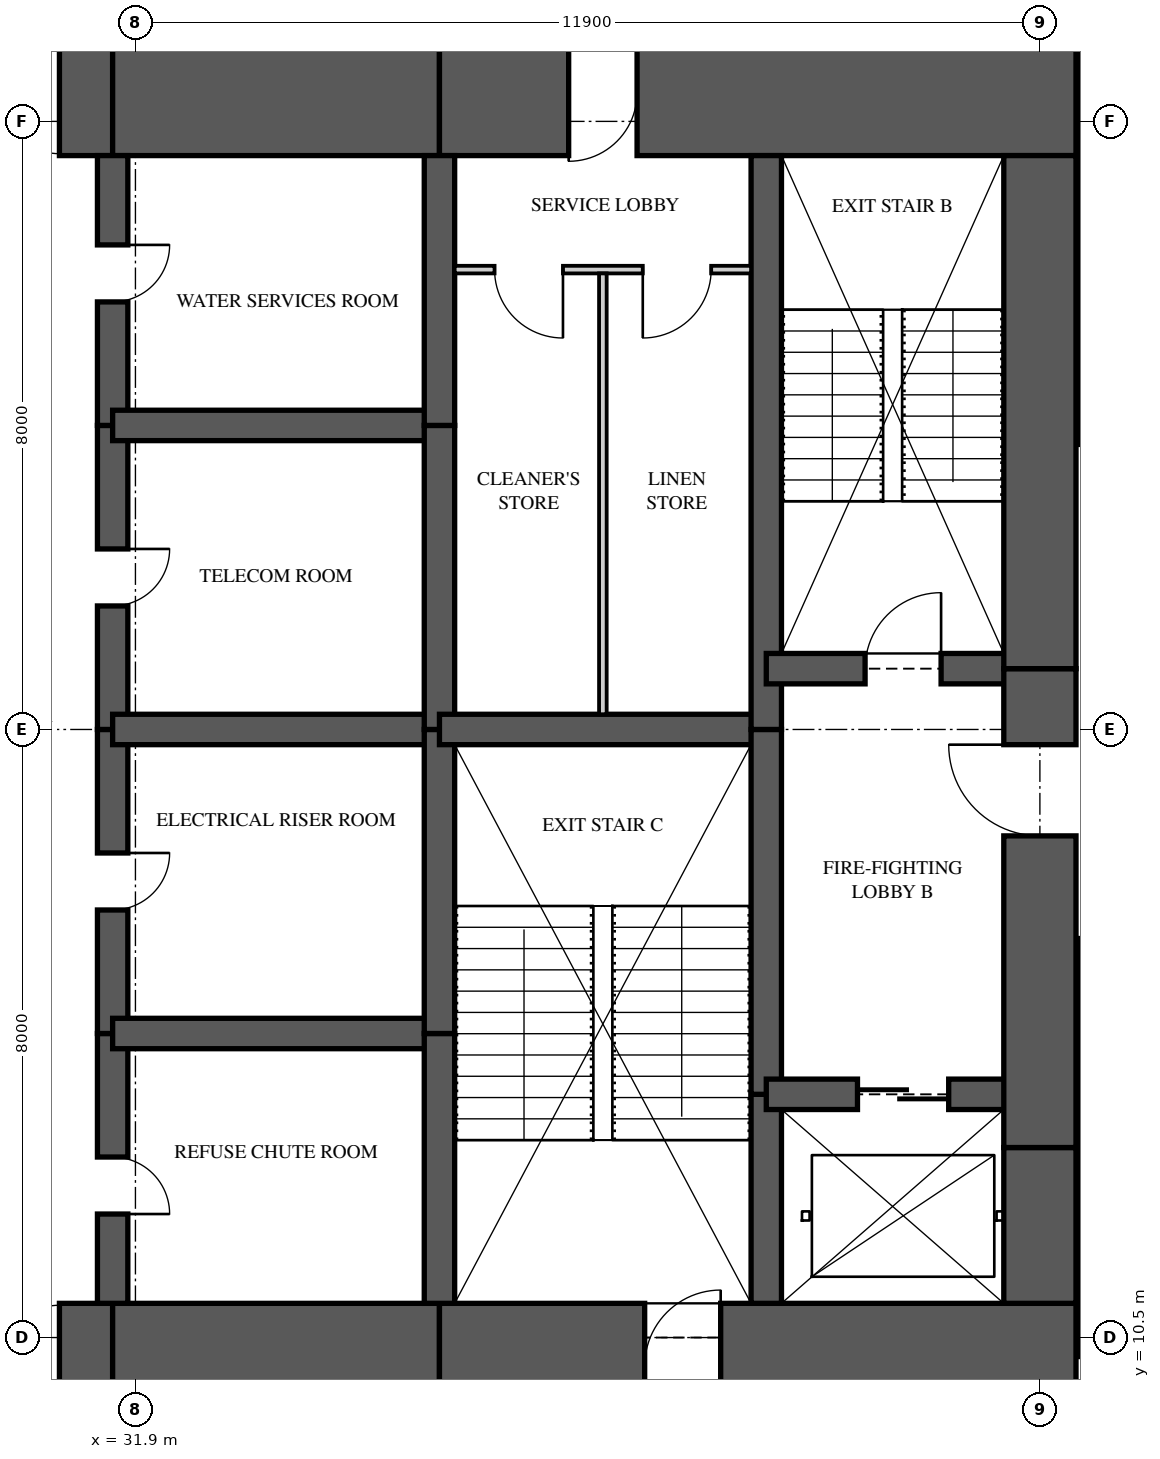
"""IFC4 building model, lengths in metres.
Left out: names, types, materials, properties, quantities, classifications, styles, units other than length and angle.
Written with IfcOpenShell. Run it as: python <this file> out.ifc"""

import sys

from ifc_helpers import new_model, si_unit, direction, frame, frame_2d, origin, place, context, subcontext, project, spatial, rectangle, extrude, element, fill, save


model = new_model("IFC4")
c1 = context("Model", 3, precision=1e-05, world=origin(), true_north=direction((0.0, 1.0)))
c2 = subcontext(c1, "Body", "Model", "MODEL_VIEW")
j1 = project(units=[si_unit("LENGTHUNIT", "METRE"), si_unit("PLANEANGLEUNIT", "RADIAN")], contexts=[c1])
p1 = place(None, origin())
s1 = spatial("IfcSite", under=j1, at=p1, CompositionType="ELEMENT")
p2 = place(p1, origin())
s2 = spatial("IfcBuilding", under=s1, at=p2, CompositionType="ELEMENT")
p3 = place(p2, frame((0.0, 0.0, 47.8)))
s3 = spatial("IfcBuildingStorey", under=s2, at=p3, CompositionType="ELEMENT", Elevation=47.8)
p4 = place(p3, frame((26.0, 10.125, 0.0), z_axis=(0.0, 0.0, 1.0), x_axis=(1.0, 0.0, 0.0)))
e1 = element("IfcWall", 1, at=p4, inside=s3, PredefinedType="SHEAR", context=c2, shape_type="SweptSolid", body=[
    extrude(rectangle(XDim=5.6, YDim=1.65, at=frame_2d((2.8, 0.0))), origin(), (0.0, 0.0, 1.0), 3.35),
])
p5 = place(p4, frame((3.3, 0.0, 0.0)))
e2 = element("IfcOpeningElement", 2, at=p5, cuts=e1, PredefinedType="OPENING", context=c2, shape_type="SweptSolid", body=[
    extrude(rectangle(XDim=1.6, YDim=2.1, at=frame_2d((0.8, 1.05))), frame((0.0, 0.835, 0.0), z_axis=(0.0, -1.0, 0.0), x_axis=(1.0, 0.0, 0.0)), (0.0, 0.0, 1.0), 1.67),
])
p6 = place(p3, frame((31.6, 10.125, 0.0), z_axis=(0.0, 0.0, 1.0), x_axis=(1.0, 0.0, 0.0)))
e3 = element("IfcWall", 3, at=p6, inside=s3, PredefinedType="SHEAR", context=c2, shape_type="SweptSolid", body=[
    extrude(rectangle(XDim=4.3, YDim=1.65, at=frame_2d((2.15, 0.0))), origin(), (0.0, 0.0, 1.0), 3.35),
])
p7 = place(p3, frame((35.9, 10.125, 0.0), z_axis=(0.0, 0.0, 1.0), x_axis=(1.0, 0.0, 0.0)))
e4 = element("IfcWall", 4, at=p7, inside=s3, PredefinedType="SHEAR", context=c2, shape_type="SweptSolid", body=[
    extrude(rectangle(XDim=8.375, YDim=1.65, at=frame_2d((4.188, 0.0))), origin(), (0.0, 0.0, 1.0), 3.35),
])
p8 = place(p7, frame((2.7, 0.0, 0.0)))
e5 = element("IfcOpeningElement", 5, at=p8, cuts=e4, PredefinedType="OPENING", context=c2, shape_type="SweptSolid", body=[
    extrude(rectangle(XDim=1.0, YDim=2.1, at=frame_2d((0.5, 1.05))), frame((0.0, 0.835, 0.0), z_axis=(0.0, -1.0, 0.0), x_axis=(1.0, 0.0, 0.0)), (0.0, 0.0, 1.0), 1.67),
])
p9 = place(p3, frame((44.275, 26.875, 0.0), z_axis=(0.0, 0.0, 1.0), x_axis=(-1.0, 0.0, 0.0)))
e6 = element("IfcWall", 6, at=p9, inside=s3, PredefinedType="SHEAR", context=c2, shape_type="SweptSolid", body=[
    extrude(rectangle(XDim=8.375, YDim=1.65, at=frame_2d((4.188, 0.0))), origin(), (0.0, 0.0, 1.0), 3.35),
])
p10 = place(p9, frame((5.775, 0.0, 0.0)))
e7 = element("IfcOpeningElement", 7, at=p10, cuts=e6, PredefinedType="OPENING", context=c2, shape_type="SweptSolid", body=[
    extrude(rectangle(XDim=0.9, YDim=2.1, at=frame_2d((0.45, 1.05))), frame((0.0, 0.835, 0.0), z_axis=(0.0, -1.0, 0.0), x_axis=(1.0, 0.0, 0.0)), (0.0, 0.0, 1.0), 1.67),
])
p11 = place(p3, frame((35.9, 26.875, 0.0), z_axis=(0.0, 0.0, 1.0), x_axis=(-1.0, 0.0, 0.0)))
e8 = element("IfcWall", 8, at=p11, inside=s3, PredefinedType="SHEAR", context=c2, shape_type="SweptSolid", body=[
    extrude(rectangle(XDim=4.3, YDim=1.65, at=frame_2d((2.15, 0.0))), origin(), (0.0, 0.0, 1.0), 3.35),
])
p12 = place(p3, frame((31.6, 26.875, 0.0), z_axis=(0.0, 0.0, 1.0), x_axis=(-1.0, 0.0, 0.0)))
e9 = element("IfcWall", 9, at=p12, inside=s3, PredefinedType="SHEAR", context=c2, shape_type="SweptSolid", body=[
    extrude(rectangle(XDim=5.6, YDim=1.65, at=frame_2d((2.8, 0.0))), origin(), (0.0, 0.0, 1.0), 3.35),
])
p13 = place(p12, frame((0.7, 0.0, 0.0)))
e10 = element("IfcOpeningElement", 10, at=p13, cuts=e9, PredefinedType="OPENING", context=c2, shape_type="SweptSolid", body=[
    extrude(rectangle(XDim=1.6, YDim=2.1, at=frame_2d((0.8, 1.05))), frame((0.0, 0.835, 0.0), z_axis=(0.0, -1.0, 0.0), x_axis=(1.0, 0.0, 0.0)), (0.0, 0.0, 1.0), 1.67),
])
p14 = place(p3, frame((43.8, 10.95, 0.0), z_axis=(0.0, 0.0, 1.0), x_axis=(0.0, 1.0, 0.0)))
e11 = element("IfcWall", 11, at=p14, inside=s3, PredefinedType="SHEAR", context=c2, shape_type="SweptSolid", body=[
    extrude(rectangle(XDim=2.05, YDim=0.95, at=frame_2d((1.025, 0.0))), origin(), (0.0, 0.0, 1.0), 3.35),
])
p15 = place(p3, frame((43.8, 13.0, 0.0), z_axis=(0.0, 0.0, 1.0), x_axis=(0.0, 1.0, 0.0)))
e12 = element("IfcWall", 12, at=p15, inside=s3, PredefinedType="SHEAR", context=c2, shape_type="SweptSolid", body=[
    extrude(rectangle(XDim=6.3, YDim=0.95, at=frame_2d((3.15, 0.0))), origin(), (0.0, 0.0, 1.0), 3.35),
])
p16 = place(p15, frame((4.1, 0.0, 0.0)))
e13 = element("IfcOpeningElement", 13, at=p16, cuts=e12, PredefinedType="OPENING", context=c2, shape_type="SweptSolid", body=[
    extrude(rectangle(XDim=1.2, YDim=2.2, at=frame_2d((0.6, 1.1))), frame((0.0, 0.485, 0.0), z_axis=(0.0, -1.0, 0.0), x_axis=(1.0, 0.0, 0.0)), (0.0, 0.0, 1.0), 0.97),
])
p17 = place(p3, frame((43.8, 19.3, 0.0), z_axis=(0.0, 0.0, 1.0), x_axis=(0.0, 1.0, 0.0)))
e14 = element("IfcWall", 14, at=p17, inside=s3, PredefinedType="SHEAR", context=c2, shape_type="SweptSolid", body=[
    extrude(rectangle(XDim=6.75, YDim=0.95, at=frame_2d((3.375, 0.0))), origin(), (0.0, 0.0, 1.0), 3.35),
])
p18 = place(p3, frame((31.6, 10.95, 0.0), z_axis=(0.0, 0.0, 1.0), x_axis=(0.0, 1.0, 0.0)))
e15 = element("IfcWall", 15, at=p18, inside=s3, PredefinedType="SHEAR", context=c2, shape_type="SweptSolid", body=[
    extrude(rectangle(XDim=3.55, YDim=0.4, at=frame_2d((1.775, 0.0))), origin(), (0.0, 0.0, 1.0), 3.35),
])
p19 = place(p18, frame((1.175, 0.0, 0.0)))
e16 = element("IfcOpeningElement", 16, at=p19, cuts=e15, PredefinedType="OPENING", context=c2, shape_type="SweptSolid", body=[
    extrude(rectangle(XDim=0.75, YDim=2.1, at=frame_2d((0.375, 1.05))), frame((0.0, 0.21, 0.0), z_axis=(0.0, -1.0, 0.0), x_axis=(1.0, 0.0, 0.0)), (0.0, 0.0, 1.0), 0.42),
])
p20 = place(p3, frame((31.6, 14.5, 0.0), z_axis=(0.0, 0.0, 1.0), x_axis=(0.0, 1.0, 0.0)))
e17 = element("IfcWall", 17, at=p20, inside=s3, PredefinedType="SHEAR", context=c2, shape_type="SweptSolid", body=[
    extrude(rectangle(XDim=4.0, YDim=0.4, at=frame_2d((2.0, 0.0))), origin(), (0.0, 0.0, 1.0), 3.35),
])
p21 = place(p20, frame((1.625, 0.0, 0.0)))
e18 = element("IfcOpeningElement", 18, at=p21, cuts=e17, PredefinedType="OPENING", context=c2, shape_type="SweptSolid", body=[
    extrude(rectangle(XDim=0.75, YDim=2.1, at=frame_2d((0.375, 1.05))), frame((0.0, 0.21, 0.0), z_axis=(0.0, -1.0, 0.0), x_axis=(1.0, 0.0, 0.0)), (0.0, 0.0, 1.0), 0.42),
])
p22 = place(p3, frame((31.6, 18.5, 0.0), z_axis=(0.0, 0.0, 1.0), x_axis=(0.0, 1.0, 0.0)))
e19 = element("IfcWall", 19, at=p22, inside=s3, PredefinedType="SHEAR", context=c2, shape_type="SweptSolid", body=[
    extrude(rectangle(XDim=4.0, YDim=0.4, at=frame_2d((2.0, 0.0))), origin(), (0.0, 0.0, 1.0), 3.35),
])
p23 = place(p22, frame((1.625, 0.0, 0.0)))
e20 = element("IfcOpeningElement", 20, at=p23, cuts=e19, PredefinedType="OPENING", context=c2, shape_type="SweptSolid", body=[
    extrude(rectangle(XDim=0.75, YDim=2.1, at=frame_2d((0.375, 1.05))), frame((0.0, 0.21, 0.0), z_axis=(0.0, -1.0, 0.0), x_axis=(1.0, 0.0, 0.0)), (0.0, 0.0, 1.0), 0.42),
])
p24 = place(p3, frame((31.6, 22.5, 0.0), z_axis=(0.0, 0.0, 1.0), x_axis=(0.0, 1.0, 0.0)))
e21 = element("IfcWall", 21, at=p24, inside=s3, PredefinedType="SHEAR", context=c2, shape_type="SweptSolid", body=[
    extrude(rectangle(XDim=3.55, YDim=0.4, at=frame_2d((1.775, 0.0))), origin(), (0.0, 0.0, 1.0), 3.35),
])
p25 = place(p24, frame((1.625, 0.0, 0.0)))
e22 = element("IfcOpeningElement", 22, at=p25, cuts=e21, PredefinedType="OPENING", context=c2, shape_type="SweptSolid", body=[
    extrude(rectangle(XDim=0.75, YDim=2.1, at=frame_2d((0.375, 1.05))), frame((0.0, 0.21, 0.0), z_axis=(0.0, -1.0, 0.0), x_axis=(1.0, 0.0, 0.0)), (0.0, 0.0, 1.0), 0.42),
])
p26 = place(p3, frame((35.9, 10.95, 0.0), z_axis=(0.0, 0.0, 1.0), x_axis=(0.0, 1.0, 0.0)))
e23 = element("IfcWall", 23, at=p26, inside=s3, PredefinedType="SHEAR", context=c2, shape_type="SweptSolid", body=[
    extrude(rectangle(XDim=3.55, YDim=0.4, at=frame_2d((1.775, 0.0))), origin(), (0.0, 0.0, 1.0), 3.35),
])
for number, where, z_axis, x_axis in (
    (24, (35.9, 14.5, 0.0), (0.0, 0.0, 1.0), (0.0, 1.0, 0.0)),
    (25, (35.9, 18.5, 0.0), (0.0, 0.0, 1.0), (0.0, 1.0, 0.0)),
):
    element("IfcWall", number, at=place(p3, frame(where, z_axis=z_axis, x_axis=x_axis)), inside=s3, PredefinedType="SHEAR", context=c2, shape_type="SweptSolid", body=[
        extrude(rectangle(XDim=4.0, YDim=0.4, at=frame_2d((2.0, 0.0))), origin(), (0.0, 0.0, 1.0), 3.35),
    ])
p27 = place(p3, frame((35.9, 22.5, 0.0), z_axis=(0.0, 0.0, 1.0), x_axis=(0.0, 1.0, 0.0)))
e26 = element("IfcWall", 26, at=p27, inside=s3, PredefinedType="SHEAR", context=c2, shape_type="SweptSolid", body=[
    extrude(rectangle(XDim=3.55, YDim=0.4, at=frame_2d((1.775, 0.0))), origin(), (0.0, 0.0, 1.0), 3.35),
])
p28 = place(p3, frame((40.2, 10.95, 0.0), z_axis=(0.0, 0.0, 1.0), x_axis=(0.0, 1.0, 0.0)))
e27 = element("IfcWall", 27, at=p28, inside=s3, PredefinedType="SHEAR", context=c2, shape_type="SweptSolid", body=[
    extrude(rectangle(XDim=2.75, YDim=0.4, at=frame_2d((1.375, 0.0))), origin(), (0.0, 0.0, 1.0), 3.35),
])
p29 = place(p3, frame((40.2, 13.7, 0.0), z_axis=(0.0, 0.0, 1.0), x_axis=(0.0, 1.0, 0.0)))
e28 = element("IfcWall", 28, at=p29, inside=s3, PredefinedType="SHEAR", context=c2, shape_type="SweptSolid", body=[
    extrude(rectangle(XDim=4.8, YDim=0.4, at=frame_2d((2.4, 0.0))), origin(), (0.0, 0.0, 1.0), 3.35),
])
p30 = place(p3, frame((40.2, 18.5, 0.0), z_axis=(0.0, 0.0, 1.0), x_axis=(0.0, 1.0, 0.0)))
e29 = element("IfcWall", 29, at=p30, inside=s3, PredefinedType="SHEAR", context=c2, shape_type="SweptSolid", body=[
    extrude(rectangle(XDim=7.55, YDim=0.4, at=frame_2d((3.775, 0.0))), origin(), (0.0, 0.0, 1.0), 3.35),
])
for number, where, z_axis, x_axis in (
    (30, (31.6, 14.5, 0.0), (0.0, 0.0, 1.0), (1.0, 0.0, 0.0)),
    (31, (31.6, 18.5, 0.0), (0.0, 0.0, 1.0), (1.0, 0.0, 0.0)),
    (32, (31.6, 22.5, 0.0), (0.0, 0.0, 1.0), (1.0, 0.0, 0.0)),
):
    element("IfcWall", number, at=place(p3, frame(where, z_axis=z_axis, x_axis=x_axis)), inside=s3, PredefinedType="SHEAR", context=c2, shape_type="SweptSolid", body=[
        extrude(rectangle(XDim=4.3, YDim=0.4, at=frame_2d((2.15, 0.0))), origin(), (0.0, 0.0, 1.0), 3.35),
    ])
p31 = place(p3, frame((35.9, 18.5, 0.0), z_axis=(0.0, 0.0, 1.0), x_axis=(1.0, 0.0, 0.0)))
e33 = element("IfcWall", 33, at=p31, inside=s3, PredefinedType="SHEAR", context=c2, shape_type="SweptSolid", body=[
    extrude(rectangle(XDim=4.3, YDim=0.4, at=frame_2d((2.15, 0.0))), origin(), (0.0, 0.0, 1.0), 3.35),
])
p32 = place(p3, frame((40.2, 13.7, 0.0), z_axis=(0.0, 0.0, 1.0), x_axis=(1.0, 0.0, 0.0)))
e34 = element("IfcWall", 34, at=p32, inside=s3, PredefinedType="SHEAR", context=c2, shape_type="SweptSolid", body=[
    extrude(rectangle(XDim=3.6, YDim=0.4, at=frame_2d((1.8, 0.0))), origin(), (0.0, 0.0, 1.0), 3.35),
])
p33 = place(p32, frame((1.2, 0.0, 0.0)))
e35 = element("IfcOpeningElement", 35, at=p33, cuts=e34, PredefinedType="OPENING", context=c2, shape_type="SweptSolid", body=[
    extrude(rectangle(XDim=1.2, YDim=2.1, at=frame_2d((0.6, 1.05))), frame((0.0, 0.21, 0.0), z_axis=(0.0, -1.0, 0.0), x_axis=(1.0, 0.0, 0.0)), (0.0, 0.0, 1.0), 0.42),
])
p34 = place(p3, frame((40.2, 19.3, 0.0), z_axis=(0.0, 0.0, 1.0), x_axis=(1.0, 0.0, 0.0)))
e36 = element("IfcWall", 36, at=p34, inside=s3, PredefinedType="SHEAR", context=c2, shape_type="SweptSolid", body=[
    extrude(rectangle(XDim=3.6, YDim=0.4, at=frame_2d((1.8, 0.0))), origin(), (0.0, 0.0, 1.0), 3.35),
])
p35 = place(p34, frame((1.3, 0.0, 0.0)))
e37 = element("IfcOpeningElement", 37, at=p35, cuts=e36, PredefinedType="OPENING", context=c2, shape_type="SweptSolid", body=[
    extrude(rectangle(XDim=1.0, YDim=2.1, at=frame_2d((0.5, 1.05))), frame((0.0, 0.21, 0.0), z_axis=(0.0, -1.0, 0.0), x_axis=(1.0, 0.0, 0.0)), (0.0, 0.0, 1.0), 0.42),
])
p36 = place(p3, frame((36.1, 24.55, 0.0), z_axis=(0.0, 0.0, 1.0), x_axis=(1.0, 0.0, 0.0)))
e38 = element("IfcWall", 38, at=p36, inside=s3, PredefinedType="PARTITIONING", context=c2, shape_type="SweptSolid", body=[
    extrude(rectangle(XDim=3.9, YDim=0.1, at=frame_2d((1.95, 0.0))), origin(), (0.0, 0.0, 1.0), 3.11),
])
p37 = place(p36, frame((0.525, 0.0, 0.0)))
e39 = element("IfcOpeningElement", 39, at=p37, cuts=e38, PredefinedType="OPENING", context=c2, shape_type="SweptSolid", body=[
    extrude(rectangle(XDim=0.9, YDim=2.1, at=frame_2d((0.45, 1.05))), frame((0.0, 0.06, 0.0), z_axis=(0.0, -1.0, 0.0), x_axis=(1.0, 0.0, 0.0)), (0.0, 0.0, 1.0), 0.12),
])
p38 = place(p36, frame((2.475, 0.0, 0.0)))
e40 = element("IfcOpeningElement", 40, at=p38, cuts=e38, PredefinedType="OPENING", context=c2, shape_type="SweptSolid", body=[
    extrude(rectangle(XDim=0.9, YDim=2.1, at=frame_2d((0.45, 1.05))), frame((0.0, 0.06, 0.0), z_axis=(0.0, -1.0, 0.0), x_axis=(1.0, 0.0, 0.0)), (0.0, 0.0, 1.0), 0.12),
])
p39 = place(p3, frame((38.05, 18.7, 0.0), z_axis=(0.0, 0.0, 1.0), x_axis=(0.0, 1.0, 0.0)))
e41 = element("IfcWall", 41, at=p39, inside=s3, PredefinedType="PARTITIONING", context=c2, shape_type="SweptSolid", body=[
    extrude(rectangle(XDim=5.8, YDim=0.1, at=frame_2d((2.9, 0.0))), origin(), (0.0, 0.0, 1.0), 3.11),
])
p40 = place(p37, frame((0.9, 0.0, 0.0), z_axis=(0.0, 0.0, 1.0), x_axis=(-1.0, 0.0, 0.0)))
e42 = element("IfcDoor", 42, at=p40, inside=s3, OperationType="SINGLE_SWING_LEFT", PredefinedType="DOOR", context=c2, shape_type="SweptSolid", body=[
    extrude(rectangle(XDim=0.9, YDim=2.1, at=frame_2d((0.45, 1.05))), frame((0.0, 0.025, 0.0), z_axis=(0.0, -1.0, 0.0), x_axis=(1.0, 0.0, 0.0)), (0.0, 0.0, 1.0), 0.05),
])
fill(e39, e42)
p41 = place(p38, frame((0.9, 0.0, 0.0), z_axis=(0.0, 0.0, 1.0), x_axis=(-1.0, 0.0, 0.0)))
e43 = element("IfcDoor", 43, at=p41, inside=s3, OperationType="SINGLE_SWING_RIGHT", PredefinedType="DOOR", context=c2, shape_type="SweptSolid", body=[
    extrude(rectangle(XDim=0.9, YDim=2.1, at=frame_2d((0.45, 1.05))), frame((0.0, 0.025, 0.0), z_axis=(0.0, -1.0, 0.0), x_axis=(1.0, 0.0, 0.0)), (0.0, 0.0, 1.0), 0.05),
])
fill(e40, e43)
p42 = place(p35, origin())
e44 = element("IfcDoor", 44, at=p42, inside=s3, OperationType="SINGLE_SWING_RIGHT", PredefinedType="DOOR", context=c2, shape_type="SweptSolid", body=[
    extrude(rectangle(XDim=1.0, YDim=2.1, at=frame_2d((0.5, 1.05))), frame((0.0, 0.025, 0.0), z_axis=(0.0, -1.0, 0.0), x_axis=(1.0, 0.0, 0.0)), (0.0, 0.0, 1.0), 0.05),
])
fill(e37, e44)
p43 = place(p16, origin())
e45 = element("IfcDoor", 45, at=p43, inside=s3, OperationType="SINGLE_SWING_RIGHT", PredefinedType="DOOR", context=c2, shape_type="SweptSolid", body=[
    extrude(rectangle(XDim=1.2, YDim=2.2, at=frame_2d((0.6, 1.1))), frame((0.0, 0.025, 0.0), z_axis=(0.0, -1.0, 0.0), x_axis=(1.0, 0.0, 0.0)), (0.0, 0.0, 1.0), 0.05),
])
fill(e13, e45)
p44 = place(p33, origin())
e46 = element("IfcDoor", 46, at=p44, inside=s3, OperationType="SLIDING_TO_LEFT", PredefinedType="DOOR", context=c2, shape_type="SweptSolid", body=[
    extrude(rectangle(XDim=1.2, YDim=2.1, at=frame_2d((0.6, 1.05))), frame((0.0, 0.025, 0.0), z_axis=(0.0, -1.0, 0.0), x_axis=(1.0, 0.0, 0.0)), (0.0, 0.0, 1.0), 0.05),
])
fill(e35, e46)
p45 = place(p5, origin())
e47 = element("IfcDoor", 47, at=p45, inside=s3, OperationType="DOUBLE_DOOR_SINGLE_SWING", PredefinedType="DOOR", context=c2, shape_type="SweptSolid", body=[
    extrude(rectangle(XDim=1.6, YDim=2.1, at=frame_2d((0.8, 1.05))), frame((0.0, 0.025, 0.0), z_axis=(0.0, -1.0, 0.0), x_axis=(1.0, 0.0, 0.0)), (0.0, 0.0, 1.0), 0.05),
])
fill(e2, e47)
p46 = place(p13, origin())
e48 = element("IfcDoor", 48, at=p46, inside=s3, OperationType="DOUBLE_DOOR_SINGLE_SWING", PredefinedType="DOOR", context=c2, shape_type="SweptSolid", body=[
    extrude(rectangle(XDim=1.6, YDim=2.1, at=frame_2d((0.8, 1.05))), frame((0.0, 0.025, 0.0), z_axis=(0.0, -1.0, 0.0), x_axis=(1.0, 0.0, 0.0)), (0.0, 0.0, 1.0), 0.05),
])
fill(e10, e48)
p47 = place(p19, frame((0.75, 0.0, 0.0), z_axis=(0.0, 0.0, 1.0), x_axis=(-1.0, 0.0, 0.0)))
e49 = element("IfcDoor", 49, at=p47, inside=s3, OperationType="SINGLE_SWING_RIGHT", PredefinedType="DOOR", context=c2, shape_type="SweptSolid", body=[
    extrude(rectangle(XDim=0.75, YDim=2.1, at=frame_2d((0.375, 1.05))), frame((0.0, 0.025, 0.0), z_axis=(0.0, -1.0, 0.0), x_axis=(1.0, 0.0, 0.0)), (0.0, 0.0, 1.0), 0.05),
])
fill(e16, e49)
p48 = place(p21, frame((0.75, 0.0, 0.0), z_axis=(0.0, 0.0, 1.0), x_axis=(-1.0, 0.0, 0.0)))
e50 = element("IfcDoor", 50, at=p48, inside=s3, OperationType="SINGLE_SWING_LEFT", PredefinedType="DOOR", context=c2, shape_type="SweptSolid", body=[
    extrude(rectangle(XDim=0.75, YDim=2.1, at=frame_2d((0.375, 1.05))), frame((0.0, 0.025, 0.0), z_axis=(0.0, -1.0, 0.0), x_axis=(1.0, 0.0, 0.0)), (0.0, 0.0, 1.0), 0.05),
])
fill(e18, e50)
p49 = place(p23, frame((0.75, 0.0, 0.0), z_axis=(0.0, 0.0, 1.0), x_axis=(-1.0, 0.0, 0.0)))
e51 = element("IfcDoor", 51, at=p49, inside=s3, OperationType="SINGLE_SWING_LEFT", PredefinedType="DOOR", context=c2, shape_type="SweptSolid", body=[
    extrude(rectangle(XDim=0.75, YDim=2.1, at=frame_2d((0.375, 1.05))), frame((0.0, 0.025, 0.0), z_axis=(0.0, -1.0, 0.0), x_axis=(1.0, 0.0, 0.0)), (0.0, 0.0, 1.0), 0.05),
])
fill(e20, e51)
p50 = place(p25, frame((0.75, 0.0, 0.0), z_axis=(0.0, 0.0, 1.0), x_axis=(-1.0, 0.0, 0.0)))
e52 = element("IfcDoor", 52, at=p50, inside=s3, OperationType="SINGLE_SWING_LEFT", PredefinedType="DOOR", context=c2, shape_type="SweptSolid", body=[
    extrude(rectangle(XDim=0.75, YDim=2.1, at=frame_2d((0.375, 1.05))), frame((0.0, 0.025, 0.0), z_axis=(0.0, -1.0, 0.0), x_axis=(1.0, 0.0, 0.0)), (0.0, 0.0, 1.0), 0.05),
])
fill(e22, e52)
p51 = place(p8, origin())
e53 = element("IfcDoor", 53, at=p51, inside=s3, OperationType="SINGLE_SWING_RIGHT", PredefinedType="DOOR", context=c2, shape_type="SweptSolid", body=[
    extrude(rectangle(XDim=1.0, YDim=2.1, at=frame_2d((0.5, 1.05))), frame((0.0, 0.025, 0.0), z_axis=(0.0, -1.0, 0.0), x_axis=(1.0, 0.0, 0.0)), (0.0, 0.0, 1.0), 0.05),
])
fill(e5, e53)
p52 = place(p10, origin())
e54 = element("IfcDoor", 54, at=p52, inside=s3, OperationType="SINGLE_SWING_RIGHT", PredefinedType="DOOR", context=c2, shape_type="SweptSolid", body=[
    extrude(rectangle(XDim=0.9, YDim=2.1, at=frame_2d((0.45, 1.05))), frame((0.0, 0.47, 0.0), z_axis=(0.0, -1.0, 0.0), x_axis=(1.0, 0.0, 0.0)), (0.0, 0.0, 1.0), 0.8),
])
fill(e7, e54)
save(model, sys.argv[1])
